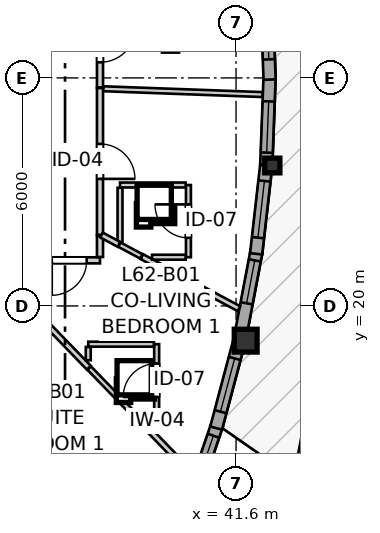
"""IFC4 building model, lengths in metres.
Left out: names, types, materials, properties, quantities, classifications, styles, units other than length and angle.
Written with IfcOpenShell. Run it as: python <this file> out.ifc"""

import sys

from ifc_helpers import new_model, si_unit, direction, frame, frame_2d, origin, origin_2d, place, context, subcontext, project, spatial, rectangle, i_section, extrude, source, transform, mapped, element, fill, save


model = new_model("IFC4")
c1 = context("Model", 3, precision=1e-05, world=origin(), true_north=direction((0.0, 1.0)))
c2 = subcontext(c1, "Body", "Model", "MODEL_VIEW")
j1 = project(units=[si_unit("LENGTHUNIT", "METRE"), si_unit("PLANEANGLEUNIT", "RADIAN")], contexts=[c1])
p1 = place(None, origin())
s1 = spatial("IfcSite", under=j1, at=p1, CompositionType="ELEMENT")
p2 = place(p1, origin())
s2 = spatial("IfcBuilding", under=s1, at=p2, CompositionType="ELEMENT")
p3 = place(p2, frame((0.0, 0.0, 208.4)))
s3 = spatial("IfcBuildingStorey", under=s2, at=p3, CompositionType="ELEMENT", Elevation=208.4)
m1 = source(origin(), c2, "Body", "SweptSolid", [
    extrude(rectangle(XDim=0.6, YDim=0.6, at=origin_2d()), origin(), (0.0, 0.0, 1.0), 2.935),
])
p4 = place(p3, frame((41.854, 19.086, 0.0), z_axis=(0.0, 0.0, 1.0), x_axis=(1.0, 0.0, 0.0)))
e1 = element("IfcColumn", 1, at=p4, inside=s3, PredefinedType="COLUMN", context=c2, shape_type="MappedRepresentation", body=[
    mapped(m1, transform((0.0, 0.0, 0.0), x_axis=(1.0, 0.0, 0.0), y_axis=(0.0, 1.0, 0.0), z_axis=(0.0, 0.0, 1.0), scale=1.0)),
])
m2 = source(origin(), c2, "Body", "SweptSolid", [
    extrude(i_section(OverallWidth=0.398, OverallDepth=0.387, WebThickness=0.019, FlangeThickness=0.03, FilletRadius=0.015, at=origin_2d()), origin(), (0.0, 0.0, 1.0), 2.935),
])
p5 = place(p3, frame((42.554, 23.696, 0.0), z_axis=(0.0, 0.0, 1.0), x_axis=(1.0, 0.0, 0.0)))
e2 = element("IfcColumn", 2, at=p5, inside=s3, PredefinedType="PILASTER", context=c2, shape_type="MappedRepresentation", body=[
    mapped(m2, transform((0.0, 0.0, 0.0), x_axis=(1.0, 0.0, 0.0), y_axis=(0.0, 1.0, 0.0), z_axis=(0.0, 0.0, 1.0), scale=1.0)),
])
p6 = place(p3, frame((40.308, 14.548, 0.0), z_axis=(0.0, 0.0, 1.0), x_axis=(0.323591564922, 0.946196860654, 0.0)))
e3 = element("IfcWall", 3, at=p6, inside=s3, PredefinedType="SOLIDWALL", context=c2, shape_type="SweptSolid", body=[
    extrude(rectangle(XDim=2.454, YDim=0.32, at=frame_2d((1.227, 0.0))), origin(), (0.0, 0.0, 1.0), 2.555),
])
p7 = place(p6, frame((1.202, 0.0, 0.82)))
e4 = element("IfcOpeningElement", 4, at=p7, cuts=e3, PredefinedType="OPENING", context=c2, shape_type="SweptSolid", body=[
    extrude(rectangle(XDim=0.95, YDim=1.35, at=frame_2d((0.475, 0.675))), frame((0.0, 0.17, 0.0), z_axis=(0.0, -1.0, 0.0), x_axis=(1.0, 0.0, 0.0)), (0.0, 0.0, 1.0), 0.34),
])
p8 = place(p3, frame((41.076, 16.786, 0.0), z_axis=(0.0, 0.0, 1.0), x_axis=(0.257037260973, 0.966401493413, 0.0)))
e5 = element("IfcWall", 5, at=p8, inside=s3, PredefinedType="SOLIDWALL", context=c2, shape_type="SweptSolid", body=[
    extrude(rectangle(XDim=2.333, YDim=0.32, at=frame_2d((1.167, 0.0))), origin(), (0.0, 0.0, 1.0), 2.555),
])
p9 = place(p8, frame((0.446, 0.0, 0.82)))
e6 = element("IfcOpeningElement", 6, at=p9, cuts=e5, PredefinedType="OPENING", context=c2, shape_type="SweptSolid", body=[
    extrude(rectangle(XDim=1.45, YDim=1.25, at=frame_2d((0.725, 0.625))), frame((0.0, 0.17, 0.0), z_axis=(0.0, -1.0, 0.0), x_axis=(1.0, 0.0, 0.0)), (0.0, 0.0, 1.0), 0.34),
])
p10 = place(p3, frame((41.713, 19.205, 0.0), z_axis=(0.0, 0.0, 1.0), x_axis=(0.186691464441, 0.982418595663, 0.0)))
e7 = element("IfcWall", 7, at=p10, inside=s3, PredefinedType="SOLIDWALL", context=c2, shape_type="SweptSolid", body=[
    extrude(rectangle(XDim=2.294, YDim=0.32, at=frame_2d((1.147, 0.0))), origin(), (0.0, 0.0, 1.0), 2.555),
])
p11 = place(p10, frame((0.88, 0.0, 0.82)))
e8 = element("IfcOpeningElement", 8, at=p11, cuts=e7, PredefinedType="OPENING", context=c2, shape_type="SweptSolid", body=[
    extrude(rectangle(XDim=1.15, YDim=1.2, at=frame_2d((0.575, 0.6))), frame((0.0, 0.17, 0.0), z_axis=(0.0, -1.0, 0.0), x_axis=(1.0, 0.0, 0.0)), (0.0, 0.0, 1.0), 0.34),
])
p12 = place(p3, frame((42.128, 21.371, 0.0), z_axis=(0.0, 0.0, 1.0), x_axis=(0.113319777802, 0.993558567956, 0.0)))
e9 = element("IfcWall", 9, at=p12, inside=s3, PredefinedType="SOLIDWALL", context=c2, shape_type="SweptSolid", body=[
    extrude(rectangle(XDim=2.338, YDim=0.32, at=frame_2d((1.169, 0.0))), origin(), (0.0, 0.0, 1.0), 2.555),
])
p13 = place(p12, frame((0.429, 0.0, 0.82)))
e10 = element("IfcOpeningElement", 10, at=p13, cuts=e9, PredefinedType="OPENING", context=c2, shape_type="SweptSolid", body=[
    extrude(rectangle(XDim=1.5, YDim=1.45, at=frame_2d((0.75, 0.725))), frame((0.0, 0.17, 0.0), z_axis=(0.0, -1.0, 0.0), x_axis=(1.0, 0.0, 0.0)), (0.0, 0.0, 1.0), 0.34),
])
p14 = place(p3, frame((42.395, 23.722, 0.0), z_axis=(0.0, 0.0, 1.0), x_axis=(0.038025668885, 0.999276762717, 0.0)))
e11 = element("IfcWall", 11, at=p14, inside=s3, PredefinedType="SOLIDWALL", context=c2, shape_type="SweptSolid", body=[
    extrude(rectangle(XDim=2.324, YDim=0.32, at=frame_2d((1.162, 0.0))), origin(), (0.0, 0.0, 1.0), 2.555),
])
p15 = place(p14, frame((0.312, 0.0, 0.82)))
e12 = element("IfcOpeningElement", 12, at=p15, cuts=e11, PredefinedType="OPENING", context=c2, shape_type="SweptSolid", body=[
    extrude(rectangle(XDim=1.35, YDim=1.45, at=frame_2d((0.675, 0.725))), frame((0.0, 0.17, 0.0), z_axis=(0.0, -1.0, 0.0), x_axis=(1.0, 0.0, 0.0)), (0.0, 0.0, 1.0), 0.34),
])
p16 = place(p3, frame((42.483, 25.956, 0.0), z_axis=(0.0, 0.0, 1.0), x_axis=(-0.038013039165, 0.999277243238, 0.0)))
e13 = element("IfcWall", 13, at=p16, inside=s3, PredefinedType="SOLIDWALL", context=c2, shape_type="SweptSolid", body=[
    extrude(rectangle(XDim=2.254, YDim=0.32, at=frame_2d((1.127, 0.0))), origin(), (0.0, 0.0, 1.0), 2.555),
])
p17 = place(p16, frame((0.532, 0.0, 0.82)))
e14 = element("IfcOpeningElement", 14, at=p17, cuts=e13, PredefinedType="OPENING", context=c2, shape_type="SweptSolid", body=[
    extrude(rectangle(XDim=1.2, YDim=1.45, at=frame_2d((0.6, 0.725))), frame((0.0, 0.17, 0.0), z_axis=(0.0, -1.0, 0.0), x_axis=(1.0, 0.0, 0.0)), (0.0, 0.0, 1.0), 0.34),
])
p18 = place(p3, frame((38.02, 25.733, 0.0), z_axis=(0.0, 0.0, 1.0), x_axis=(0.0, -1.0, 0.0)))
e15 = element("IfcWall", 15, at=p18, inside=s3, PredefinedType="PARTITIONING", context=c2, shape_type="SweptSolid", body=[
    extrude(rectangle(XDim=3.862, YDim=0.16, at=frame_2d((1.931, 0.0))), origin(), (0.0, 0.0, 1.0), 2.935),
])
p19 = place(p18, frame((1.47, 0.0, 0.0)))
e16 = element("IfcOpeningElement", 16, at=p19, cuts=e15, PredefinedType="OPENING", context=c2, shape_type="SweptSolid", body=[
    extrude(rectangle(XDim=0.92, YDim=2.1, at=frame_2d((0.46, 1.05))), frame((0.0, 0.09, 0.0), z_axis=(0.0, -1.0, 0.0), x_axis=(1.0, 0.0, 0.0)), (0.0, 0.0, 1.0), 0.18),
])
p20 = place(p3, frame((38.02, 28.023, 0.0), z_axis=(0.0, 0.0, 1.0), x_axis=(0.0, -1.0, 0.0)))
e17 = element("IfcWall", 17, at=p20, inside=s3, PredefinedType="PARTITIONING", context=c2, shape_type="SweptSolid", body=[
    extrude(rectangle(XDim=2.275, YDim=0.16, at=frame_2d((1.137, 0.0))), origin(), (0.0, 0.0, 1.0), 2.935),
])
p21 = place(p20, frame((0.662, 0.0, 0.0)))
e18 = element("IfcOpeningElement", 18, at=p21, cuts=e17, PredefinedType="OPENING", context=c2, shape_type="SweptSolid", body=[
    extrude(rectangle(XDim=0.95, YDim=2.1, at=frame_2d((0.475, 1.05))), frame((0.0, 0.09, 0.0), z_axis=(0.0, -1.0, 0.0), x_axis=(1.0, 0.0, 0.0)), (0.0, 0.0, 1.0), 0.18),
])
p22 = place(p3, frame((39.511, 17.094, 0.0), z_axis=(0.0, 0.0, 1.0), x_axis=(0.0, 1.0, 0.0)))
e19 = element("IfcWall", 19, at=p22, inside=s3, PredefinedType="PARTITIONING", context=c2, shape_type="SweptSolid", body=[
    extrude(rectangle(XDim=1.9, YDim=0.13, at=frame_2d((0.95, 0.0))), origin(), (0.0, 0.0, 1.0), 2.935),
])
p23 = place(p22, frame((0.51, 0.0, 0.0)))
e20 = element("IfcOpeningElement", 20, at=p23, cuts=e19, PredefinedType="OPENING", context=c2, shape_type="SweptSolid", body=[
    extrude(rectangle(XDim=0.88, YDim=2.05, at=frame_2d((0.44, 1.025))), frame((0.0, 0.075, 0.0), z_axis=(0.0, -1.0, 0.0), x_axis=(1.0, 0.0, 0.0)), (0.0, 0.0, 1.0), 0.15),
])
p24 = place(p3, frame((40.347, 21.282, 0.0), z_axis=(0.0, 0.0, 1.0), x_axis=(0.0, 1.0, 0.0)))
e21 = element("IfcWall", 21, at=p24, inside=s3, PredefinedType="PARTITIONING", context=c2, shape_type="SweptSolid", body=[
    extrude(rectangle(XDim=1.9, YDim=0.13, at=frame_2d((0.95, 0.0))), origin(), (0.0, 0.0, 1.0), 2.573),
])
p25 = place(p24, frame((0.51, 0.0, 0.0)))
e22 = element("IfcOpeningElement", 22, at=p25, cuts=e21, PredefinedType="OPENING", context=c2, shape_type="SweptSolid", body=[
    extrude(rectangle(XDim=0.88, YDim=2.05, at=frame_2d((0.44, 1.025))), frame((0.0, 0.075, 0.0), z_axis=(0.0, -1.0, 0.0), x_axis=(1.0, 0.0, 0.0)), (0.0, 0.0, 1.0), 0.15),
])
p26 = place(p3, frame((38.02, 21.2, 0.0), z_axis=(0.0, 0.0, 1.0), x_axis=(-1.0, 0.0, 0.0)))
e23 = element("IfcWall", 23, at=p26, inside=s3, PredefinedType="PARTITIONING", context=c2, shape_type="SweptSolid", body=[
    extrude(rectangle(XDim=1.612, YDim=0.16, at=frame_2d((0.806, 0.0))), origin(), (0.0, 0.0, 1.0), 2.935),
])
p27 = place(p26, frame((0.35, 0.0, 0.0)))
e24 = element("IfcOpeningElement", 24, at=p27, cuts=e23, PredefinedType="OPENING", context=c2, shape_type="SweptSolid", body=[
    extrude(rectangle(XDim=0.92, YDim=2.1, at=frame_2d((0.46, 1.05))), frame((0.0, 0.09, 0.0), z_axis=(0.0, -1.0, 0.0), x_axis=(1.0, 0.0, 0.0)), (0.0, 0.0, 1.0), 0.18),
])
p28 = place(p3, frame((38.11, 25.715, 0.0), z_axis=(0.0, 0.0, 1.0), x_axis=(0.99933433165, -0.036481414253, 0.0)))
e25 = element("IfcWall", 25, at=p28, inside=s3, PredefinedType="PARTITIONING", context=c2, shape_type="SweptSolid", body=[
    extrude(rectangle(XDim=4.189, YDim=0.13, at=frame_2d((2.095, 0.0))), origin(), (0.0, 0.0, 1.0), 2.935),
])
p29 = place(p3, frame((39.122, 21.297, 0.0), z_axis=(0.0, 0.0, 1.0), x_axis=(0.881308328415, -0.472541670402, 0.0)))
e26 = element("IfcWall", 26, at=p29, inside=s3, PredefinedType="PARTITIONING", context=c2, shape_type="SweptSolid", body=[
    extrude(rectangle(XDim=2.898, YDim=0.145, at=frame_2d((1.449, 0.0))), origin(), (0.0, 0.0, 1.0), 2.935),
])
p30 = place(p3, frame((38.951, 17.109, 0.0), z_axis=(0.0, 0.0, 1.0), x_axis=(0.695195716836, -0.718820502833, 0.0)))
e27 = element("IfcWall", 27, at=p30, inside=s3, PredefinedType="PARTITIONING", context=c2, shape_type="SweptSolid", body=[
    extrude(rectangle(XDim=2.18, YDim=0.145, at=frame_2d((1.09, 0.0))), origin(), (0.0, 0.0, 1.0), 2.935),
])
p31 = place(p3, frame((36.458, 19.686, 0.0), z_axis=(0.0, 0.0, 1.0), x_axis=(0.695231916786, -0.718785490868, 0.0)))
e28 = element("IfcWall", 28, at=p31, inside=s3, PredefinedType="PARTITIONING", context=c2, shape_type="SweptSolid", body=[
    extrude(rectangle(XDim=1.824, YDim=0.145, at=frame_2d((0.912, 0.0))), origin(), (0.0, 0.0, 1.0), 2.935),
])
p32 = place(p3, frame((37.711, 18.994, 0.0), z_axis=(0.0, 0.0, 1.0), x_axis=(1.0, 0.0, 0.0)))
e29 = element("IfcWall", 29, at=p32, inside=s3, PredefinedType="PARTITIONING", context=c2, shape_type="SweptSolid", body=[
    extrude(rectangle(XDim=1.727, YDim=0.13, at=frame_2d((0.864, 0.0))), origin(), (0.0, 0.0, 1.0), 2.935),
])
p33 = place(p3, frame((38.547, 23.182, 0.0), z_axis=(0.0, 0.0, 1.0), x_axis=(1.0, 0.0, 0.0)))
e30 = element("IfcWall", 30, at=p33, inside=s3, PredefinedType="PARTITIONING", context=c2, shape_type="SweptSolid", body=[
    extrude(rectangle(XDim=1.727, YDim=0.13, at=frame_2d((0.863, 0.0))), origin(), (0.0, 0.0, 1.0), 2.935),
])
p34 = place(p3, frame((37.736, 18.364, 0.0), z_axis=(0.0, 0.0, 1.0), x_axis=(0.695451956037, -0.718572596781, 0.0)))
e31 = element("IfcWall", 31, at=p34, inside=s3, PredefinedType="PARTITIONING", context=c2, shape_type="SweptSolid", body=[
    extrude(rectangle(XDim=1.732, YDim=0.13, at=frame_2d((0.866, 0.0))), origin(), (0.0, 0.0, 1.0), 2.935),
])
p35 = place(p3, frame((38.547, 21.605, 0.0), z_axis=(0.0, 0.0, 1.0), x_axis=(0.0, 1.0, 0.0)))
e32 = element("IfcWall", 32, at=p35, inside=s3, PredefinedType="PARTITIONING", context=c2, shape_type="SweptSolid", body=[
    extrude(rectangle(XDim=1.504, YDim=0.13, at=frame_2d((0.752, 0.0))), origin(), (0.0, 0.0, 1.0), 2.603),
])
p36 = place(p3, frame((39.39, 21.282, 0.0), z_axis=(0.0, 0.0, 1.0), x_axis=(1.0, 0.0, 0.0)))
e33 = element("IfcWall", 33, at=p36, inside=s3, PredefinedType="PARTITIONING", context=c2, shape_type="SweptSolid", body=[
    extrude(rectangle(XDim=0.884, YDim=0.13, at=frame_2d((0.442, 0.0))), origin(), (0.0, 0.0, 1.0), 2.935),
])
p37 = place(p3, frame((38.02, 21.288, 0.0), z_axis=(0.0, 0.0, 1.0), x_axis=(0.0, 1.0, 0.0)))
e34 = element("IfcWall", 34, at=p37, inside=s3, PredefinedType="PARTITIONING", context=c2, shape_type="SweptSolid", body=[
    extrude(rectangle(XDim=0.568, YDim=0.16, at=frame_2d((0.284, 0.0))), origin(), (0.0, 0.0, 1.0), 2.935),
])
p38 = place(p3, frame((38.532, 21.613, 0.0), z_axis=(0.0, 0.0, 1.0), x_axis=(0.881618593919, -0.471962556626, 0.0)))
e35 = element("IfcWall", 35, at=p38, inside=s3, PredefinedType="PARTITIONING", context=c2, shape_type="SweptSolid", body=[
    extrude(rectangle(XDim=0.654, YDim=0.13, at=frame_2d((0.327, 0.0))), origin(), (0.0, 0.0, 1.0), 2.935),
])
p39 = place(p3, frame((37.711, 18.571, 0.0), z_axis=(0.0, 0.0, 1.0), x_axis=(0.0, 1.0, 0.0)))
e36 = element("IfcWall", 36, at=p39, inside=s3, PredefinedType="PARTITIONING", context=c2, shape_type="SweptSolid", body=[
    extrude(rectangle(XDim=0.35, YDim=0.13, at=frame_2d((0.175, 0.0))), origin(), (0.0, 0.0, 1.0), 2.935),
])
p40 = place(p3, frame((38.06, 21.867, 0.0), z_axis=(0.0, 0.0, 1.0), x_axis=(0.881026965879, -0.473066047601, 0.0)))
e37 = element("IfcWall", 37, at=p40, inside=s3, PredefinedType="PARTITIONING", context=c2, shape_type="SweptSolid", body=[
    extrude(rectangle(XDim=0.521, YDim=0.145, at=frame_2d((0.261, 0.0))), origin(), (0.0, 0.0, 1.0), 2.935),
])
p41 = place(p3, frame((39.056, 17.094, 0.0), z_axis=(0.0, 0.0, 1.0), x_axis=(1.0, 0.0, 0.0)))
e38 = element("IfcWall", 38, at=p41, inside=s3, PredefinedType="PARTITIONING", context=c2, shape_type="SweptSolid", body=[
    extrude(rectangle(XDim=0.455, YDim=0.13, at=frame_2d((0.228, 0.0))), origin(), (0.0, 0.0, 1.0), 2.935),
])
m3 = source(origin(), c2, "Body", "SweptSolid", [
    extrude(rectangle(XDim=0.95, YDim=1.35, at=frame_2d((0.475, 0.675))), frame((0.0, 0.03, 0.0), z_axis=(0.0, -1.0, 0.0), x_axis=(1.0, 0.0, 0.0)), (0.0, 0.0, 1.0), 0.06),
])
p42 = place(p7, origin())
e39 = element("IfcWindow", 39, at=p42, inside=s3, PartitioningType="SINGLE_PANEL", PredefinedType="WINDOW", context=c2, shape_type="MappedRepresentation", body=[
    mapped(m3, transform((0.0, 0.0, 0.0), x_axis=(1.0, 0.0, 0.0), y_axis=(0.0, 1.0, 0.0), z_axis=(0.0, 0.0, 1.0), scale=1.0)),
])
fill(e4, e39)
m4 = source(origin(), c2, "Body", "SweptSolid", [
    extrude(rectangle(XDim=1.45, YDim=1.25, at=frame_2d((0.725, 0.625))), frame((0.0, 0.03, 0.0), z_axis=(0.0, -1.0, 0.0), x_axis=(1.0, 0.0, 0.0)), (0.0, 0.0, 1.0), 0.06),
])
p43 = place(p9, origin())
e40 = element("IfcWindow", 40, at=p43, inside=s3, PartitioningType="SINGLE_PANEL", PredefinedType="WINDOW", context=c2, shape_type="MappedRepresentation", body=[
    mapped(m4, transform((0.0, 0.0, 0.0), x_axis=(1.0, 0.0, 0.0), y_axis=(0.0, 1.0, 0.0), z_axis=(0.0, 0.0, 1.0), scale=1.0)),
])
fill(e6, e40)
m5 = source(origin(), c2, "Body", "SweptSolid", [
    extrude(rectangle(XDim=1.15, YDim=1.2, at=frame_2d((0.575, 0.6))), frame((0.0, 0.03, 0.0), z_axis=(0.0, -1.0, 0.0), x_axis=(1.0, 0.0, 0.0)), (0.0, 0.0, 1.0), 0.06),
])
p44 = place(p11, origin())
e41 = element("IfcWindow", 41, at=p44, inside=s3, PartitioningType="SINGLE_PANEL", PredefinedType="WINDOW", context=c2, shape_type="MappedRepresentation", body=[
    mapped(m5, transform((0.0, 0.0, 0.0), x_axis=(1.0, 0.0, 0.0), y_axis=(0.0, 1.0, 0.0), z_axis=(0.0, 0.0, 1.0), scale=1.0)),
])
fill(e8, e41)
m6 = source(origin(), c2, "Body", "SweptSolid", [
    extrude(rectangle(XDim=1.5, YDim=1.45, at=frame_2d((0.75, 0.725))), frame((0.0, 0.03, 0.0), z_axis=(0.0, -1.0, 0.0), x_axis=(1.0, 0.0, 0.0)), (0.0, 0.0, 1.0), 0.06),
])
p45 = place(p13, origin())
e42 = element("IfcWindow", 42, at=p45, inside=s3, PartitioningType="SINGLE_PANEL", PredefinedType="WINDOW", context=c2, shape_type="MappedRepresentation", body=[
    mapped(m6, transform((0.0, 0.0, 0.0), x_axis=(1.0, 0.0, 0.0), y_axis=(0.0, 1.0, 0.0), z_axis=(0.0, 0.0, 1.0), scale=1.0)),
])
fill(e10, e42)
m7 = source(origin(), c2, "Body", "SweptSolid", [
    extrude(rectangle(XDim=1.35, YDim=1.45, at=frame_2d((0.675, 0.725))), frame((0.0, 0.03, 0.0), z_axis=(0.0, -1.0, 0.0), x_axis=(1.0, 0.0, 0.0)), (0.0, 0.0, 1.0), 0.06),
])
p46 = place(p15, origin())
e43 = element("IfcWindow", 43, at=p46, inside=s3, PartitioningType="SINGLE_PANEL", PredefinedType="WINDOW", context=c2, shape_type="MappedRepresentation", body=[
    mapped(m7, transform((0.0, 0.0, 0.0), x_axis=(1.0, 0.0, 0.0), y_axis=(0.0, 1.0, 0.0), z_axis=(0.0, 0.0, 1.0), scale=1.0)),
])
fill(e12, e43)
m8 = source(origin(), c2, "Body", "SweptSolid", [
    extrude(rectangle(XDim=1.2, YDim=1.45, at=frame_2d((0.6, 0.725))), frame((0.0, 0.03, 0.0), z_axis=(0.0, -1.0, 0.0), x_axis=(1.0, 0.0, 0.0)), (0.0, 0.0, 1.0), 0.06),
])
p47 = place(p17, origin())
e44 = element("IfcWindow", 44, at=p47, inside=s3, PartitioningType="SINGLE_PANEL", PredefinedType="WINDOW", context=c2, shape_type="MappedRepresentation", body=[
    mapped(m8, transform((0.0, 0.0, 0.0), x_axis=(1.0, 0.0, 0.0), y_axis=(0.0, 1.0, 0.0), z_axis=(0.0, 0.0, 1.0), scale=1.0)),
])
fill(e14, e44)
m9 = source(origin(), c2, "Body", "SweptSolid", [
    extrude(rectangle(XDim=0.92, YDim=2.1, at=frame_2d((0.46, 1.05))), frame((0.0, 0.025, 0.0), z_axis=(0.0, -1.0, 0.0), x_axis=(1.0, 0.0, 0.0)), (0.0, 0.0, 1.0), 0.05),
])
p48 = place(p19, origin())
e45 = element("IfcDoor", 45, at=p48, inside=s3, OperationType="SINGLE_SWING_RIGHT", PredefinedType="DOOR", context=c2, shape_type="MappedRepresentation", body=[
    mapped(m9, transform((0.0, 0.0, 0.0), x_axis=(1.0, 0.0, 0.0), y_axis=(0.0, 1.0, 0.0), z_axis=(0.0, 0.0, 1.0), scale=1.0)),
])
fill(e16, e45)
m10 = source(origin(), c2, "Body", "SweptSolid", [
    extrude(rectangle(XDim=0.95, YDim=2.1, at=frame_2d((0.475, 1.05))), frame((0.0, 0.025, 0.0), z_axis=(0.0, -1.0, 0.0), x_axis=(1.0, 0.0, 0.0)), (0.0, 0.0, 1.0), 0.05),
])
p49 = place(p21, origin())
e46 = element("IfcDoor", 46, at=p49, inside=s3, OperationType="SINGLE_SWING_LEFT", PredefinedType="DOOR", context=c2, shape_type="MappedRepresentation", body=[
    mapped(m10, transform((0.0, 0.0, 0.0), x_axis=(1.0, 0.0, 0.0), y_axis=(0.0, 1.0, 0.0), z_axis=(0.0, 0.0, 1.0), scale=1.0)),
])
fill(e18, e46)
m11 = source(origin(), c2, "Body", "SweptSolid", [
    extrude(rectangle(XDim=0.88, YDim=2.05, at=frame_2d((0.44, 1.025))), frame((0.0, 0.025, 0.0), z_axis=(0.0, -1.0, 0.0), x_axis=(1.0, 0.0, 0.0)), (0.0, 0.0, 1.0), 0.05),
])
p50 = place(p23, origin())
e47 = element("IfcDoor", 47, at=p50, inside=s3, OperationType="SINGLE_SWING_LEFT", PredefinedType="DOOR", context=c2, shape_type="MappedRepresentation", body=[
    mapped(m11, transform((0.0, 0.0, 0.0), x_axis=(1.0, 0.0, 0.0), y_axis=(0.0, 1.0, 0.0), z_axis=(0.0, 0.0, 1.0), scale=1.0)),
])
fill(e20, e47)
p51 = place(p25, origin())
e48 = element("IfcDoor", 48, at=p51, inside=s3, OperationType="SINGLE_SWING_RIGHT", PredefinedType="DOOR", context=c2, shape_type="MappedRepresentation", body=[
    mapped(m11, transform((0.0, 0.0, 0.0), x_axis=(1.0, 0.0, 0.0), y_axis=(0.0, 1.0, 0.0), z_axis=(0.0, 0.0, 1.0), scale=1.0)),
])
fill(e22, e48)
p52 = place(p27, origin())
e49 = element("IfcDoor", 49, at=p52, inside=s3, OperationType="SINGLE_SWING_RIGHT", PredefinedType="DOOR", context=c2, shape_type="MappedRepresentation", body=[
    mapped(m9, transform((0.0, 0.0, 0.0), x_axis=(1.0, 0.0, 0.0), y_axis=(0.0, 1.0, 0.0), z_axis=(0.0, 0.0, 1.0), scale=1.0)),
])
fill(e24, e49)
save(model, sys.argv[1])
